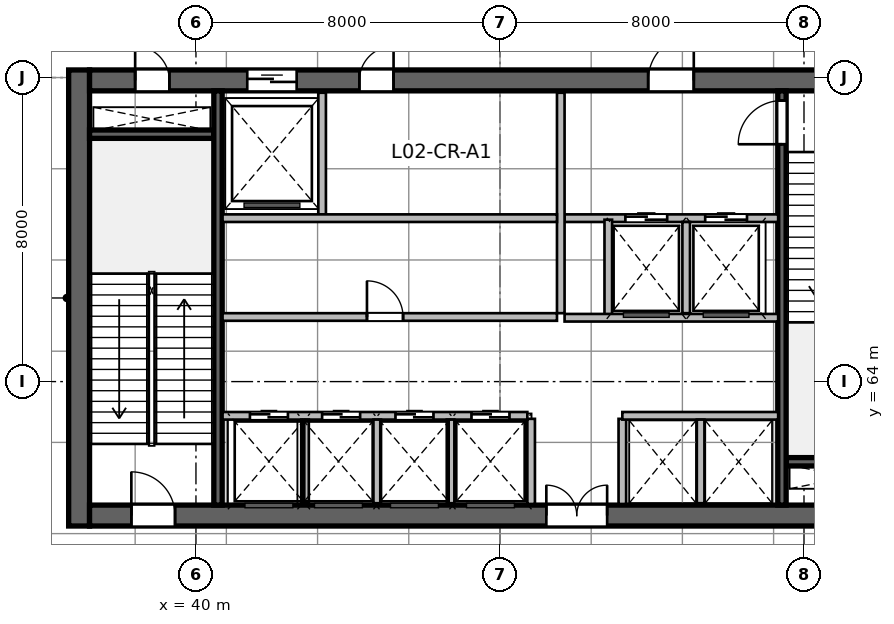
"""IFC4 building model, lengths in metres.
Left out: names, types, materials, properties, quantities, classifications, styles, units other than length and angle.
Written with IfcOpenShell. Run it as: python <this file> out.ifc"""

import sys

from ifc_helpers import new_model, si_unit, direction, frame, frame_2d, origin, place, context, subcontext, project, spatial, rectangle, extrude, source, transform, mapped, element, fill, save


model = new_model("IFC4")
c1 = context("Model", 3, precision=1e-05, world=origin(), true_north=direction((0.0, 1.0)))
c2 = subcontext(c1, "Body", "Model", "MODEL_VIEW")
j1 = project(units=[si_unit("LENGTHUNIT", "METRE"), si_unit("PLANEANGLEUNIT", "RADIAN")], contexts=[c1])
p1 = place(None, origin())
s1 = spatial("IfcSite", under=j1, at=p1, CompositionType="ELEMENT")
p2 = place(p1, origin())
s2 = spatial("IfcBuilding", under=s1, at=p2, CompositionType="ELEMENT")
p3 = place(p2, frame((0.0, 0.0, 12.0)))
s3 = spatial("IfcBuildingStorey", under=s2, at=p3, CompositionType="ELEMENT", Elevation=12.0)
m1 = source(origin(), c2, "Body", "SweptSolid", [
    extrude(rectangle(XDim=12.0, YDim=0.55, at=frame_2d((6.0, 0.0))), origin(), (0.0, 0.0, 1.0), 6.0),
])
p4 = place(p3, frame((36.925, 60.2, 0.0), z_axis=(0.0, 0.0, 1.0), x_axis=(0.0, 1.0, 0.0)))
e1 = element("IfcWall", 1, at=p4, inside=s3, PredefinedType="SHEAR", context=c2, shape_type="MappedRepresentation", body=[
    mapped(m1, transform((0.0, 0.0, 0.0), scale=1.0)),
])
m2 = source(origin(), c2, "Body", "SweptSolid", [
    extrude(rectangle(XDim=21.6, YDim=0.55, at=frame_2d((10.8, 0.0))), origin(), (0.0, 0.0, 1.0), 6.0),
])
p5 = place(p3, frame((37.2, 60.475, 0.0), z_axis=(0.0, 0.0, 1.0), x_axis=(1.0, 0.0, 0.0)))
e2 = element("IfcWall", 2, at=p5, inside=s3, PredefinedType="SHEAR", context=c2, shape_type="MappedRepresentation", body=[
    mapped(m2, transform((0.0, 0.0, 0.0), scale=1.0)),
])
p6 = place(p5, frame((1.1, 0.0, 0.0)))
e3 = element("IfcOpeningElement", 3, at=p6, cuts=e2, PredefinedType="OPENING", context=c2, shape_type="SweptSolid", body=[
    extrude(rectangle(XDim=1.15, YDim=2.15, at=frame_2d((0.575, 1.075))), frame((0.0, 0.285, 0.0), z_axis=(0.0, -1.0, 0.0), x_axis=(1.0, 0.0, 0.0)), (0.0, 0.0, 1.0), 0.57),
])
p7 = place(p5, frame((19.5, 0.0, 0.0)))
e4 = element("IfcOpeningElement", 4, at=p7, cuts=e2, PredefinedType="OPENING", context=c2, shape_type="SweptSolid", body=[
    extrude(rectangle(XDim=0.9, YDim=2.1, at=frame_2d((0.45, 1.05))), frame((0.0, 0.285, 0.0), z_axis=(0.0, -1.0, 0.0), x_axis=(1.0, 0.0, 0.0)), (0.0, 0.0, 1.0), 0.57),
])
p8 = place(p5, frame((12.02, 0.0, 0.0)))
e5 = element("IfcOpeningElement", 5, at=p8, cuts=e2, PredefinedType="OPENING", context=c2, shape_type="SweptSolid", body=[
    extrude(rectangle(XDim=1.6, YDim=2.15, at=frame_2d((0.8, 1.075))), frame((0.0, 0.285, 0.0), z_axis=(0.0, -1.0, 0.0), x_axis=(1.0, 0.0, 0.0)), (0.0, 0.0, 1.0), 0.57),
])
p9 = place(p3, frame((37.2, 71.925, 0.0), z_axis=(0.0, 0.0, 1.0), x_axis=(1.0, 0.0, 0.0)))
e6 = element("IfcWall", 6, at=p9, inside=s3, PredefinedType="SHEAR", context=c2, shape_type="MappedRepresentation", body=[
    mapped(m2, transform((0.0, 0.0, 0.0), scale=1.0)),
])
p10 = place(p9, frame((1.2, 0.0, 0.0)))
e7 = element("IfcOpeningElement", 7, at=p10, cuts=e6, PredefinedType="OPENING", context=c2, shape_type="SweptSolid", body=[
    extrude(rectangle(XDim=0.9, YDim=2.1, at=frame_2d((0.45, 1.05))), frame((0.0, 0.285, 0.0), z_axis=(0.0, -1.0, 0.0), x_axis=(1.0, 0.0, 0.0)), (0.0, 0.0, 1.0), 0.57),
])
p11 = place(p9, frame((14.7, 0.0, 0.0)))
e8 = element("IfcOpeningElement", 8, at=p11, cuts=e6, PredefinedType="OPENING", context=c2, shape_type="SweptSolid", body=[
    extrude(rectangle(XDim=1.2, YDim=2.15, at=frame_2d((0.6, 1.075))), frame((0.0, 0.285, 0.0), z_axis=(0.0, -1.0, 0.0), x_axis=(1.0, 0.0, 0.0)), (0.0, 0.0, 1.0), 0.57),
])
p12 = place(p9, frame((4.15, 0.0, 0.0)))
e9 = element("IfcOpeningElement", 9, at=p12, cuts=e6, PredefinedType="OPENING", context=c2, shape_type="SweptSolid", body=[
    extrude(rectangle(XDim=1.3, YDim=2.15, at=frame_2d((0.65, 1.075))), frame((0.0, 0.285, 0.0), z_axis=(0.0, -1.0, 0.0), x_axis=(1.0, 0.0, 0.0)), (0.0, 0.0, 1.0), 0.57),
])
p13 = place(p9, frame((7.1, 0.0, 0.0)))
e10 = element("IfcOpeningElement", 10, at=p13, cuts=e6, PredefinedType="OPENING", context=c2, shape_type="SweptSolid", body=[
    extrude(rectangle(XDim=0.9, YDim=2.1, at=frame_2d((0.45, 1.05))), frame((0.0, 0.285, 0.0), z_axis=(0.0, -1.0, 0.0), x_axis=(1.0, 0.0, 0.0)), (0.0, 0.0, 1.0), 0.57),
])
m3 = source(origin(), c2, "Body", "SweptSolid", [
    extrude(rectangle(XDim=3.27, YDim=0.22, at=frame_2d((1.635, 0.0))), origin(), (0.0, 0.0, 1.0), 6.0),
])
for number, where, z_axis, x_axis in (
    (11, (37.2, 70.51, 0.0), (0.0, 0.0, 1.0), (1.0, 0.0, 0.0)),
    (12, (55.53, 61.89, 0.0), (0.0, 0.0, 1.0), (1.0, 0.0, 0.0)),
):
    element("IfcWall", number, at=place(p3, frame(where, z_axis=z_axis, x_axis=x_axis)), inside=s3, PredefinedType="SHEAR", context=c2, shape_type="MappedRepresentation", body=[
        mapped(m3, transform((0.0, 0.0, 0.0), scale=1.0)),
    ])
m4 = source(origin(), c2, "Body", "SweptSolid", [
    extrude(rectangle(XDim=10.9, YDim=0.22, at=frame_2d((5.45, 0.0))), origin(), (0.0, 0.0, 1.0), 6.0),
])
p14 = place(p3, frame((40.58, 60.75, 0.0), z_axis=(0.0, 0.0, 1.0), x_axis=(0.0, 1.0, 0.0)))
e13 = element("IfcWall", 13, at=p14, inside=s3, PredefinedType="SHEAR", context=c2, shape_type="MappedRepresentation", body=[
    mapped(m4, transform((0.0, 0.0, 0.0), scale=1.0)),
])
p15 = place(p3, frame((55.42, 60.75, 0.0), z_axis=(0.0, 0.0, 1.0), x_axis=(0.0, 1.0, 0.0)))
e14 = element("IfcWall", 14, at=p15, inside=s3, PredefinedType="SHEAR", context=c2, shape_type="MappedRepresentation", body=[
    mapped(m4, transform((0.0, 0.0, 0.0), scale=1.0)),
])
p16 = place(p15, frame((9.495, 0.0, 0.0)))
e15 = element("IfcOpeningElement", 15, at=p16, cuts=e14, PredefinedType="OPENING", context=c2, shape_type="SweptSolid", body=[
    extrude(rectangle(XDim=1.15, YDim=2.15, at=frame_2d((0.575, 1.075))), frame((0.0, 0.12, 0.0), z_axis=(0.0, -1.0, 0.0), x_axis=(1.0, 0.0, 0.0)), (0.0, 0.0, 1.0), 0.24),
])
m5 = source(origin(), c2, "Body", "SweptSolid", [
    extrude(rectangle(XDim=2.24, YDim=0.2, at=frame_2d((1.12, 0.0))), origin(), (0.0, 0.0, 1.0), 5.7),
])
for number, where, z_axis, x_axis in (
    (16, (48.82, 60.78, 0.0), (0.0, 0.0, 1.0), (0.0, 1.0, 0.0)),
    (17, (51.22, 60.78, 0.0), (0.0, 0.0, 1.0), (0.0, 1.0, 0.0)),
):
    element("IfcWall", number, at=place(p3, frame(where, z_axis=z_axis, x_axis=x_axis)), inside=s3, PredefinedType="SOLIDWALL", context=c2, shape_type="MappedRepresentation", body=[
        mapped(m5, transform((0.0, 0.0, 0.0), scale=1.0)),
    ])
m6 = source(origin(), c2, "Body", "SweptSolid", [
    extrude(rectangle(XDim=5.62, YDim=0.2, at=frame_2d((2.81, 0.0))), origin(), (0.0, 0.0, 1.0), 5.7),
])
p17 = place(p3, frame((49.7, 68.3, 0.0), z_axis=(0.0, 0.0, 1.0), x_axis=(1.0, 0.0, 0.0)))
e18 = element("IfcWall", 18, at=p17, inside=s3, PredefinedType="SOLIDWALL", context=c2, shape_type="MappedRepresentation", body=[
    mapped(m6, transform((0.0, 0.0, 0.0), scale=1.0)),
])
p18 = place(p17, frame((1.6, 0.0, 0.0)))
e19 = element("IfcOpeningElement", 19, at=p18, cuts=e18, PredefinedType="OPENING", context=c2, shape_type="SweptSolid", body=[
    extrude(rectangle(XDim=1.1, YDim=2.15, at=frame_2d((0.55, 1.075))), frame((0.0, 0.11, 0.0), z_axis=(0.0, -1.0, 0.0), x_axis=(1.0, 0.0, 0.0)), (0.0, 0.0, 1.0), 0.22),
])
p19 = place(p17, frame((3.7, 0.0, 0.0)))
e20 = element("IfcOpeningElement", 20, at=p19, cuts=e18, PredefinedType="OPENING", context=c2, shape_type="SweptSolid", body=[
    extrude(rectangle(XDim=1.1, YDim=2.15, at=frame_2d((0.55, 1.075))), frame((0.0, 0.11, 0.0), z_axis=(0.0, -1.0, 0.0), x_axis=(1.0, 0.0, 0.0)), (0.0, 0.0, 1.0), 0.22),
])
m7 = source(origin(), c2, "Body", "SweptSolid", [
    extrude(rectangle(XDim=5.8, YDim=0.2, at=frame_2d((2.9, 0.0))), origin(), (0.0, 0.0, 1.0), 5.7),
])
p20 = place(p3, frame((49.6, 65.8, 0.0), z_axis=(0.0, 0.0, 1.0), x_axis=(0.0, 1.0, 0.0)))
e21 = element("IfcWall", 21, at=p20, inside=s3, PredefinedType="SOLIDWALL", context=c2, shape_type="MappedRepresentation", body=[
    mapped(m7, transform((0.0, 0.0, 0.0), scale=1.0)),
])
m8 = source(origin(), c2, "Body", "SweptSolid", [
    extrude(rectangle(XDim=2.58, YDim=0.2, at=frame_2d((1.29, 0.0))), origin(), (0.0, 0.0, 1.0), 5.7),
])
p21 = place(p3, frame((50.85, 65.68, 0.0), z_axis=(0.0, 0.0, 1.0), x_axis=(0.0, 1.0, 0.0)))
e22 = element("IfcWall", 22, at=p21, inside=s3, PredefinedType="SOLIDWALL", context=c2, shape_type="MappedRepresentation", body=[
    mapped(m8, transform((0.0, 0.0, 0.0), scale=1.0)),
])
m9 = source(origin(), c2, "Body", "SweptSolid", [
    extrude(rectangle(XDim=2.4, YDim=0.2, at=frame_2d((1.2, 0.0))), origin(), (0.0, 0.0, 1.0), 5.7),
])
p22 = place(p3, frame((52.9, 65.8, 0.0), z_axis=(0.0, 0.0, 1.0), x_axis=(0.0, 1.0, 0.0)))
e23 = element("IfcWall", 23, at=p22, inside=s3, PredefinedType="SOLIDWALL", context=c2, shape_type="MappedRepresentation", body=[
    mapped(m9, transform((0.0, 0.0, 0.0), scale=1.0)),
])
p23 = place(p3, frame((49.7, 65.68, 0.0), z_axis=(0.0, 0.0, 1.0), x_axis=(1.0, 0.0, 0.0)))
e24 = element("IfcWall", 24, at=p23, inside=s3, PredefinedType="SOLIDWALL", context=c2, shape_type="MappedRepresentation", body=[
    mapped(m6, transform((0.0, 0.0, 0.0), scale=1.0)),
])
m10 = source(origin(), c2, "Body", "SweptSolid", [
    extrude(rectangle(XDim=3.2, YDim=0.2, at=frame_2d((1.6, 0.0))), origin(), (0.0, 0.0, 1.0), 5.7),
])
p24 = place(p3, frame((43.32, 68.4, 0.0), z_axis=(0.0, 0.0, 1.0), x_axis=(0.0, 1.0, 0.0)))
e25 = element("IfcWall", 25, at=p24, inside=s3, PredefinedType="SOLIDWALL", context=c2, shape_type="MappedRepresentation", body=[
    mapped(m10, transform((0.0, 0.0, 0.0), scale=1.0)),
])
m11 = source(origin(), c2, "Body", "SweptSolid", [
    extrude(rectangle(XDim=8.8, YDim=0.2, at=frame_2d((4.4, 0.0))), origin(), (0.0, 0.0, 1.0), 5.7),
])
p25 = place(p3, frame((40.7, 68.3, 0.0), z_axis=(0.0, 0.0, 1.0), x_axis=(1.0, 0.0, 0.0)))
e26 = element("IfcWall", 26, at=p25, inside=s3, PredefinedType="SOLIDWALL", context=c2, shape_type="MappedRepresentation", body=[
    mapped(m11, transform((0.0, 0.0, 0.0), scale=1.0)),
])
m12 = source(origin(), c2, "Body", "SweptSolid", [
    extrude(rectangle(XDim=8.02, YDim=0.2, at=frame_2d((4.01, 0.0))), origin(), (0.0, 0.0, 1.0), 5.7),
])
p26 = place(p3, frame((40.7, 63.1, 0.0), z_axis=(0.0, 0.0, 1.0), x_axis=(1.0, 0.0, 0.0)))
e27 = element("IfcWall", 27, at=p26, inside=s3, PredefinedType="SOLIDWALL", context=c2, shape_type="MappedRepresentation", body=[
    mapped(m12, transform((0.0, 0.0, 0.0), scale=1.0)),
])
p27 = place(p26, frame((0.72, 0.0, 0.0)))
e28 = element("IfcOpeningElement", 28, at=p27, cuts=e27, PredefinedType="OPENING", context=c2, shape_type="SweptSolid", body=[
    extrude(rectangle(XDim=1.0, YDim=2.15, at=frame_2d((0.5, 1.075))), frame((0.0, 0.11, 0.0), z_axis=(0.0, -1.0, 0.0), x_axis=(1.0, 0.0, 0.0)), (0.0, 0.0, 1.0), 0.22),
])
p28 = place(p26, frame((2.62, 0.0, 0.0)))
e29 = element("IfcOpeningElement", 29, at=p28, cuts=e27, PredefinedType="OPENING", context=c2, shape_type="SweptSolid", body=[
    extrude(rectangle(XDim=1.0, YDim=2.15, at=frame_2d((0.5, 1.075))), frame((0.0, 0.11, 0.0), z_axis=(0.0, -1.0, 0.0), x_axis=(1.0, 0.0, 0.0)), (0.0, 0.0, 1.0), 0.22),
])
p29 = place(p26, frame((4.55, 0.0, 0.0)))
e30 = element("IfcOpeningElement", 30, at=p29, cuts=e27, PredefinedType="OPENING", context=c2, shape_type="SweptSolid", body=[
    extrude(rectangle(XDim=1.0, YDim=2.15, at=frame_2d((0.5, 1.075))), frame((0.0, 0.11, 0.0), z_axis=(0.0, -1.0, 0.0), x_axis=(1.0, 0.0, 0.0)), (0.0, 0.0, 1.0), 0.22),
])
p30 = place(p26, frame((6.55, 0.0, 0.0)))
e31 = element("IfcOpeningElement", 31, at=p30, cuts=e27, PredefinedType="OPENING", context=c2, shape_type="SweptSolid", body=[
    extrude(rectangle(XDim=1.0, YDim=2.15, at=frame_2d((0.5, 1.075))), frame((0.0, 0.11, 0.0), z_axis=(0.0, -1.0, 0.0), x_axis=(1.0, 0.0, 0.0)), (0.0, 0.0, 1.0), 0.22),
])
m13 = source(origin(), c2, "Body", "SweptSolid", [
    extrude(rectangle(XDim=4.1, YDim=0.2, at=frame_2d((2.05, 0.0))), origin(), (0.0, 0.0, 1.0), 5.7),
])
p31 = place(p3, frame((51.22, 63.1, 0.0), z_axis=(0.0, 0.0, 1.0), x_axis=(1.0, 0.0, 0.0)))
e32 = element("IfcWall", 32, at=p31, inside=s3, PredefinedType="SOLIDWALL", context=c2, shape_type="MappedRepresentation", body=[
    mapped(m13, transform((0.0, 0.0, 0.0), scale=1.0)),
])
m14 = source(origin(), c2, "Body", "SweptSolid", [
    extrude(rectangle(XDim=2.2, YDim=0.2, at=frame_2d((1.1, 0.0))), origin(), (0.0, 0.0, 1.0), 5.7),
])
for number, where, z_axis, x_axis in (
    (33, (42.87, 60.8, 0.0), (0.0, 0.0, 1.0), (0.0, 1.0, 0.0)),
    (34, (44.77, 60.8, 0.0), (0.0, 0.0, 1.0), (0.0, 1.0, 0.0)),
    (35, (46.7, 60.8, 0.0), (0.0, 0.0, 1.0), (0.0, 1.0, 0.0)),
    (36, (53.28, 60.8, 0.0), (0.0, 0.0, 1.0), (0.0, 1.0, 0.0)),
):
    element("IfcWall", number, at=place(p3, frame(where, z_axis=z_axis, x_axis=x_axis)), inside=s3, PredefinedType="SOLIDWALL", context=c2, shape_type="MappedRepresentation", body=[
        mapped(m14, transform((0.0, 0.0, 0.0), scale=1.0)),
    ])
p32 = place(p3, frame((40.7, 65.7, 0.0), z_axis=(0.0, 0.0, 1.0), x_axis=(1.0, 0.0, 0.0)))
e37 = element("IfcWall", 37, at=p32, inside=s3, PredefinedType="SOLIDWALL", context=c2, shape_type="MappedRepresentation", body=[
    mapped(m11, transform((0.0, 0.0, 0.0), scale=1.0)),
])
p33 = place(p32, frame((3.8, 0.0, 0.0)))
e38 = element("IfcOpeningElement", 38, at=p33, cuts=e37, PredefinedType="OPENING", context=c2, shape_type="SweptSolid", body=[
    extrude(rectangle(XDim=0.95, YDim=2.15, at=frame_2d((0.475, 1.075))), frame((0.0, 0.11, 0.0), z_axis=(0.0, -1.0, 0.0), x_axis=(1.0, 0.0, 0.0)), (0.0, 0.0, 1.0), 0.22),
])
m15 = source(origin(), c2, "Body", "SweptSolid", [
    extrude(rectangle(XDim=1.15, YDim=2.15, at=frame_2d((0.575, 1.075))), frame((0.0, 0.025, 0.0), z_axis=(0.0, -1.0, 0.0), x_axis=(1.0, 0.0, 0.0)), (0.0, 0.0, 1.0), 0.05),
])
p34 = place(p6, origin())
e39 = element("IfcDoor", 39, at=p34, inside=s3, OperationType="SINGLE_SWING_LEFT", PredefinedType="DOOR", context=c2, shape_type="MappedRepresentation", body=[
    mapped(m15, transform((0.0, 0.0, 0.0), scale=1.0)),
])
fill(e3, e39)
m16 = source(origin(), c2, "Body", "SweptSolid", [
    extrude(rectangle(XDim=0.9, YDim=2.1, at=frame_2d((0.45, 1.05))), frame((0.0, 0.025, 0.0), z_axis=(0.0, -1.0, 0.0), x_axis=(1.0, 0.0, 0.0)), (0.0, 0.0, 1.0), 0.05),
])
p35 = place(p10, origin())
e40 = element("IfcDoor", 40, at=p35, inside=s3, OperationType="SINGLE_SWING_LEFT", PredefinedType="DOOR", context=c2, shape_type="MappedRepresentation", body=[
    mapped(m16, transform((0.0, 0.0, 0.0), scale=1.0)),
])
fill(e7, e40)
p36 = place(p16, origin())
e41 = element("IfcDoor", 41, at=p36, inside=s3, OperationType="SINGLE_SWING_LEFT", PredefinedType="DOOR", context=c2, shape_type="MappedRepresentation", body=[
    mapped(m15, transform((0.0, 0.0, 0.0), scale=1.0)),
])
fill(e15, e41)
m17 = source(origin(), c2, "Body", "SweptSolid", [
    extrude(rectangle(XDim=1.6, YDim=2.15, at=frame_2d((0.8, 1.075))), frame((0.0, 0.025, 0.0), z_axis=(0.0, -1.0, 0.0), x_axis=(1.0, 0.0, 0.0)), (0.0, 0.0, 1.0), 0.05),
])
p37 = place(p8, origin())
e42 = element("IfcDoor", 42, at=p37, inside=s3, OperationType="DOUBLE_DOOR_SINGLE_SWING", PredefinedType="DOOR", context=c2, shape_type="MappedRepresentation", body=[
    mapped(m17, transform((0.0, 0.0, 0.0), scale=1.0)),
])
fill(e5, e42)
m18 = source(origin(), c2, "Body", "SweptSolid", [
    extrude(rectangle(XDim=1.2, YDim=2.15, at=frame_2d((0.6, 1.075))), frame((0.0, 0.025, 0.0), z_axis=(0.0, -1.0, 0.0), x_axis=(1.0, 0.0, 0.0)), (0.0, 0.0, 1.0), 0.05),
])
p38 = place(p11, origin())
e43 = element("IfcDoor", 43, at=p38, inside=s3, OperationType="SINGLE_SWING_RIGHT", PredefinedType="DOOR", context=c2, shape_type="MappedRepresentation", body=[
    mapped(m18, transform((0.0, 0.0, 0.0), scale=1.0)),
])
fill(e8, e43)
m19 = source(origin(), c2, "Body", "SweptSolid", [
    extrude(rectangle(XDim=1.1, YDim=2.15, at=frame_2d((0.55, 1.075))), frame((0.0, 0.025, 0.0), z_axis=(0.0, -1.0, 0.0), x_axis=(1.0, 0.0, 0.0)), (0.0, 0.0, 1.0), 0.05),
])
p39 = place(p18, origin())
e44 = element("IfcDoor", 44, at=p39, inside=s3, OperationType="DOUBLE_DOOR_SLIDING", PredefinedType="DOOR", context=c2, shape_type="MappedRepresentation", body=[
    mapped(m19, transform((0.0, 0.0, 0.0), scale=1.0)),
])
fill(e19, e44)
p40 = place(p19, origin())
e45 = element("IfcDoor", 45, at=p40, inside=s3, OperationType="DOUBLE_DOOR_SLIDING", PredefinedType="DOOR", context=c2, shape_type="MappedRepresentation", body=[
    mapped(m19, transform((0.0, 0.0, 0.0), scale=1.0)),
])
fill(e20, e45)
m20 = source(origin(), c2, "Body", "SweptSolid", [
    extrude(rectangle(XDim=1.3, YDim=2.15, at=frame_2d((0.65, 1.075))), frame((0.0, 0.025, 0.0), z_axis=(0.0, -1.0, 0.0), x_axis=(1.0, 0.0, 0.0)), (0.0, 0.0, 1.0), 0.05),
])
p41 = place(p12, origin())
e46 = element("IfcDoor", 46, at=p41, inside=s3, OperationType="DOUBLE_DOOR_SLIDING", PredefinedType="DOOR", context=c2, shape_type="MappedRepresentation", body=[
    mapped(m20, transform((0.0, 0.0, 0.0), scale=1.0)),
])
fill(e9, e46)
p42 = place(p13, origin())
e47 = element("IfcDoor", 47, at=p42, inside=s3, OperationType="SINGLE_SWING_RIGHT", PredefinedType="DOOR", context=c2, shape_type="MappedRepresentation", body=[
    mapped(m16, transform((0.0, 0.0, 0.0), scale=1.0)),
])
fill(e10, e47)
m21 = source(origin(), c2, "Body", "SweptSolid", [
    extrude(rectangle(XDim=1.0, YDim=2.15, at=frame_2d((0.5, 1.075))), frame((0.0, 0.025, 0.0), z_axis=(0.0, -1.0, 0.0), x_axis=(1.0, 0.0, 0.0)), (0.0, 0.0, 1.0), 0.05),
])
p43 = place(p27, origin())
e48 = element("IfcDoor", 48, at=p43, inside=s3, OperationType="DOUBLE_DOOR_SLIDING", PredefinedType="DOOR", context=c2, shape_type="MappedRepresentation", body=[
    mapped(m21, transform((0.0, 0.0, 0.0), scale=1.0)),
])
fill(e28, e48)
p44 = place(p28, origin())
e49 = element("IfcDoor", 49, at=p44, inside=s3, OperationType="DOUBLE_DOOR_SLIDING", PredefinedType="DOOR", context=c2, shape_type="MappedRepresentation", body=[
    mapped(m21, transform((0.0, 0.0, 0.0), scale=1.0)),
])
fill(e29, e49)
p45 = place(p29, origin())
e50 = element("IfcDoor", 50, at=p45, inside=s3, OperationType="DOUBLE_DOOR_SLIDING", PredefinedType="DOOR", context=c2, shape_type="MappedRepresentation", body=[
    mapped(m21, transform((0.0, 0.0, 0.0), scale=1.0)),
])
fill(e30, e50)
p46 = place(p30, origin())
e51 = element("IfcDoor", 51, at=p46, inside=s3, OperationType="DOUBLE_DOOR_SLIDING", PredefinedType="DOOR", context=c2, shape_type="MappedRepresentation", body=[
    mapped(m21, transform((0.0, 0.0, 0.0), scale=1.0)),
])
fill(e31, e51)
m22 = source(origin(), c2, "Body", "SweptSolid", [
    extrude(rectangle(XDim=0.95, YDim=2.15, at=frame_2d((0.475, 1.075))), frame((0.0, 0.025, 0.0), z_axis=(0.0, -1.0, 0.0), x_axis=(1.0, 0.0, 0.0)), (0.0, 0.0, 1.0), 0.05),
])
p47 = place(p33, origin())
e52 = element("IfcDoor", 52, at=p47, inside=s3, OperationType="SINGLE_SWING_LEFT", PredefinedType="DOOR", context=c2, shape_type="MappedRepresentation", body=[
    mapped(m22, transform((0.0, 0.0, 0.0), scale=1.0)),
])
fill(e38, e52)
save(model, sys.argv[1])
